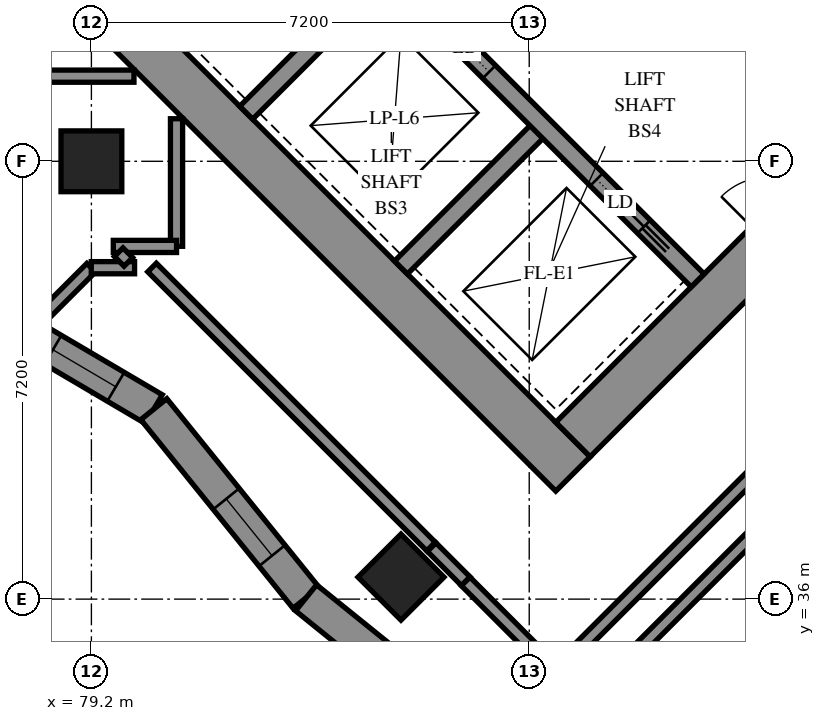
"""IFC4 building model, lengths in metres.
Left out: names, types, materials, properties, quantities, classifications, styles, units other than length and angle.
Written with IfcOpenShell. Run it as: python <this file> out.ifc"""

import sys

from ifc_helpers import new_model, si_unit, direction, frame, frame_2d, origin, origin_2d, place, context, subcontext, project, spatial, polyline, rectangle, outline, extrude, element, fill, save


model = new_model("IFC4")
c1 = context("Model", 3, precision=1e-05, world=origin(), true_north=direction((0.0, 1.0)))
c2 = subcontext(c1, "Body", "Model", "MODEL_VIEW")
j1 = project(units=[si_unit("LENGTHUNIT", "METRE"), si_unit("PLANEANGLEUNIT", "RADIAN")], contexts=[c1])
p1 = place(None, origin())
s1 = spatial("IfcSite", under=j1, at=p1, CompositionType="ELEMENT")
p2 = place(p1, origin())
s2 = spatial("IfcBuilding", under=s1, at=p2, CompositionType="ELEMENT")
p3 = place(p2, frame((0.0, 0.0, 94.8)))
s3 = spatial("IfcBuildingStorey", under=s2, at=p3, CompositionType="ELEMENT", Elevation=94.8)
for number, where, z_axis, x_axis in (
    (1, (79.2, 43.2, 0.0), (0.0, 0.0, 1.0), (1.0, 0.0, 0.0)),
    (2, (84.291, 36.362, 0.0), (0.0, 0.0, 1.0), (0.707, -0.707, 0.0)),
):
    element("IfcColumn", number, at=place(p3, frame(where, z_axis=z_axis, x_axis=x_axis)), inside=s3, PredefinedType="COLUMN", context=c2, shape_type="SweptSolid", body=[
        extrude(rectangle(XDim=1.0, YDim=1.0, at=origin_2d()), origin(), (0.0, 0.0, 1.0), 3.1),
    ])
p4 = place(p3, frame((75.806, 49.373, -0.3), z_axis=(0.0, 0.0, 1.0), x_axis=(0.7071067812, -0.7071067812, 0.0)))
e3 = element("IfcWall", 3, at=p4, inside=s3, PredefinedType="SHEAR", context=c2, shape_type="SweptSolid", body=[
    extrude(rectangle(XDim=16.0, YDim=0.8, at=frame_2d((8.0, 0.0))), origin(), (0.0, 0.0, 1.0), 2.7),
])
p5 = place(p3, frame((87.12, 38.625, -0.3), z_axis=(0.0, 0.0, 1.0), x_axis=(0.7071067812, 0.7071067812, 0.0)))
e4 = element("IfcWall", 4, at=p5, inside=s3, PredefinedType="SHEAR", context=c2, shape_type="SweptSolid", body=[
    extrude(rectangle(XDim=14.4, YDim=0.8, at=frame_2d((7.2, 0.0))), origin(), (0.0, 0.0, 1.0), 2.7),
])
p6 = place(p5, frame((4.55, 0.0, 0.3)))
e5 = element("IfcOpeningElement", 5, at=p6, cuts=e4, PredefinedType="OPENING", context=c2, shape_type="SweptSolid", body=[
    extrude(rectangle(XDim=1.1, YDim=2.1, at=frame_2d((0.55, 1.05))), frame((0.0, 0.41, 0.0), z_axis=(0.0, -1.0, 0.0), x_axis=(1.0, 0.0, 0.0)), (0.0, 0.0, 1.0), 0.82),
])
p7 = place(p5, frame((11.35, 0.0, 0.3)))
e6 = element("IfcOpeningElement", 6, at=p7, cuts=e4, PredefinedType="OPENING", context=c2, shape_type="SweptSolid", body=[
    extrude(rectangle(XDim=1.1, YDim=2.1, at=frame_2d((0.55, 1.05))), frame((0.0, 0.41, 0.0), z_axis=(0.0, -1.0, 0.0), x_axis=(1.0, 0.0, 0.0)), (0.0, 0.0, 1.0), 0.82),
])
for number, where, z_axis, x_axis in (
    (7, (81.746, 43.999, 0.0), (0.0, 0.0, 1.0), (0.707, 0.707, 0.0)),
    (8, (84.291, 41.453, 0.0), (0.0, 0.0, 1.0), (0.707, 0.707, 0.0)),
):
    element("IfcWall", number, at=place(p3, frame(where, z_axis=z_axis, x_axis=x_axis)), inside=s3, PredefinedType="SOLIDWALL", context=c2, shape_type="SweptSolid", body=[
        extrude(rectangle(XDim=3.3, YDim=0.3, at=frame_2d((1.65, 0.0))), origin(), (0.0, 0.0, 1.0), 3.1),
    ])
p8 = place(p3, frame((78.988, 51.423, 0.0), z_axis=(0.0, 0.0, 1.0), x_axis=(0.7071067812, -0.7071067812, 0.0)))
e9 = element("IfcWall", 9, at=p8, inside=s3, PredefinedType="SOLIDWALL", context=c2, shape_type="SweptSolid", body=[
    extrude(rectangle(XDim=14.4, YDim=0.3, at=frame_2d((7.2, 0.0))), origin(), (0.0, 0.0, 1.0), 3.1),
])
p9 = place(p8, frame((1.25, 0.0, 0.0)))
e10 = element("IfcOpeningElement", 10, at=p9, cuts=e9, PredefinedType="OPENING", context=c2, shape_type="SweptSolid", body=[
    extrude(rectangle(XDim=1.1, YDim=2.1, at=frame_2d((0.55, 1.05))), frame((0.0, 0.16, 0.0), z_axis=(0.0, -1.0, 0.0), x_axis=(1.0, 0.0, 0.0)), (0.0, 0.0, 1.0), 0.32),
])
p10 = place(p8, frame((4.85, 0.0, 0.0)))
e11 = element("IfcOpeningElement", 11, at=p10, cuts=e9, PredefinedType="OPENING", context=c2, shape_type="SweptSolid", body=[
    extrude(rectangle(XDim=1.1, YDim=2.1, at=frame_2d((0.55, 1.05))), frame((0.0, 0.16, 0.0), z_axis=(0.0, -1.0, 0.0), x_axis=(1.0, 0.0, 0.0)), (0.0, 0.0, 1.0), 0.32),
])
p11 = place(p8, frame((8.45, 0.0, 0.0)))
e12 = element("IfcOpeningElement", 12, at=p11, cuts=e9, PredefinedType="OPENING", context=c2, shape_type="SweptSolid", body=[
    extrude(rectangle(XDim=1.1, YDim=2.1, at=frame_2d((0.55, 1.05))), frame((0.0, 0.16, 0.0), z_axis=(0.0, -1.0, 0.0), x_axis=(1.0, 0.0, 0.0)), (0.0, 0.0, 1.0), 0.32),
])
p12 = place(p8, frame((12.05, 0.0, 0.0)))
e13 = element("IfcOpeningElement", 13, at=p12, cuts=e9, PredefinedType="OPENING", context=c2, shape_type="SweptSolid", body=[
    extrude(rectangle(XDim=1.1, YDim=2.1, at=frame_2d((0.55, 1.05))), frame((0.0, 0.16, 0.0), z_axis=(0.0, -1.0, 0.0), x_axis=(1.0, 0.0, 0.0)), (0.0, 0.0, 1.0), 0.32),
])
p13 = place(p3, frame((81.534, 53.969, 0.0), z_axis=(0.0, 0.0, 1.0), x_axis=(0.707103309, -0.7071102534, 0.0)))
e14 = element("IfcWall", 14, at=p13, inside=s3, PredefinedType="SOLIDWALL", context=c2, shape_type="SweptSolid", body=[
    extrude(rectangle(XDim=14.4, YDim=0.3, at=frame_2d((7.2, 0.0))), origin(), (0.0, 0.0, 1.0), 3.1),
])
p14 = place(p13, frame((12.05, 0.0, 0.0)))
e15 = element("IfcOpeningElement", 15, at=p14, cuts=e14, PredefinedType="OPENING", context=c2, shape_type="SweptSolid", body=[
    extrude(rectangle(XDim=1.1, YDim=2.1, at=frame_2d((0.55, 1.05))), frame((0.0, 0.16, 0.0), z_axis=(0.0, -1.0, 0.0), x_axis=(1.0, 0.0, 0.0)), (0.0, 0.0, 1.0), 0.32),
])
p15 = place(p3, frame((76.644, 41.233, 0.0), z_axis=(0.0, 0.0, 1.0), x_axis=(0.861767211, -0.5073039267, 0.0)))
e16 = element("IfcWall", 16, at=p15, inside=s3, PredefinedType="SOLIDWALL", context=c2, shape_type="SweptSolid", body=[
    extrude(outline(polyline([(0.033, -0.275), (4.107, -0.275), (4.207, 0.275), (-0.033, 0.275), (0.033, -0.275)])), origin(), (0.0, 0.0, 1.0), 3.1),
])
p16 = place(p15, frame((0.353, 0.0, 0.5)))
e17 = element("IfcOpeningElement", 17, at=p16, cuts=e16, PredefinedType="OPENING", context=c2, shape_type="SweptSolid", body=[
    extrude(rectangle(XDim=1.2, YDim=2.45, at=frame_2d((0.6, 1.225))), frame((0.0, 0.285, 0.0), z_axis=(0.0, -1.0, 0.0), x_axis=(1.0, 0.0, 0.0)), (0.0, 0.0, 1.0), 0.57),
])
p17 = place(p15, frame((2.232, 0.0, 0.5)))
e18 = element("IfcOpeningElement", 18, at=p17, cuts=e16, PredefinedType="OPENING", context=c2, shape_type="SweptSolid", body=[
    extrude(rectangle(XDim=1.2, YDim=2.45, at=frame_2d((0.6, 1.225))), frame((0.0, 0.285, 0.0), z_axis=(0.0, -1.0, 0.0), x_axis=(1.0, 0.0, 0.0)), (0.0, 0.0, 1.0), 0.57),
])
p18 = place(p3, frame((80.226, 39.124, 0.0), z_axis=(0.0, 0.0, 1.0), x_axis=(0.6280387215, -0.7781820894, 0.0)))
e19 = element("IfcWall", 19, at=p18, inside=s3, PredefinedType="SOLIDWALL", context=c2, shape_type="SweptSolid", body=[
    extrude(outline(polyline([(0.05, -0.275), (4.016, -0.275), (3.958, 0.275), (-0.05, 0.275), (0.05, -0.275)])), origin(), (0.0, 0.0, 1.0), 3.1),
])
p19 = place(p18, frame((1.896, 0.0, 0.5)))
e20 = element("IfcOpeningElement", 20, at=p19, cuts=e19, PredefinedType="OPENING", context=c2, shape_type="SweptSolid", body=[
    extrude(rectangle(XDim=1.2, YDim=2.45, at=frame_2d((0.6, 1.225))), frame((0.0, 0.285, 0.0), z_axis=(0.0, -1.0, 0.0), x_axis=(1.0, 0.0, 0.0)), (0.0, 0.0, 1.0), 0.57),
])
p20 = place(p3, frame((82.73, 36.021, 0.0), z_axis=(0.0, 0.0, 1.0), x_axis=(0.7781804948, -0.6280406974, 0.0)))
e21 = element("IfcWall", 21, at=p20, inside=s3, PredefinedType="SOLIDWALL", context=c2, shape_type="SweptSolid", body=[
    extrude(outline(polyline([(-0.029, -0.275), (3.937, -0.275), (3.996, 0.275), (0.029, 0.275), (-0.029, -0.275)])), origin(), (0.0, 0.0, 1.0), 3.1),
])
p21 = place(p20, frame((1.717, 0.0, 0.5)))
e22 = element("IfcOpeningElement", 22, at=p21, cuts=e21, PredefinedType="OPENING", context=c2, shape_type="SweptSolid", body=[
    extrude(rectangle(XDim=1.2, YDim=2.45, at=frame_2d((0.6, 1.225))), frame((0.0, 0.285, 0.0), z_axis=(0.0, -1.0, 0.0), x_axis=(1.0, 0.0, 0.0)), (0.0, 0.0, 1.0), 0.57),
])
p22 = place(p3, frame((86.835, 34.806, 0.0), z_axis=(0.0, 0.0, 1.0), x_axis=(0.7071067812, 0.7071067812, 0.0)))
e23 = element("IfcWall", 23, at=p22, inside=s3, PredefinedType="PARTITIONING", context=c2, shape_type="SweptSolid", body=[
    extrude(rectangle(XDim=9.201, YDim=0.2, at=frame_2d((4.601, 0.0))), origin(), (0.0, 0.0, 1.0), 3.1),
])
p23 = place(p3, frame((86.343, 33.316, 0.0), z_axis=(0.0, 0.0, 1.0), x_axis=(0.7069848641, 0.7072286772, 0.0)))
e24 = element("IfcWall", 24, at=p23, inside=s3, PredefinedType="PARTITIONING", context=c2, shape_type="SweptSolid", body=[
    extrude(rectangle(XDim=8.203, YDim=0.2, at=frame_2d((4.101, 0.0))), origin(), (0.0, 0.0, 1.0), 3.1),
])
p24 = place(p3, frame((80.197, 41.453, 0.0), z_axis=(0.0, 0.0, 1.0), x_axis=(0.7071067812, -0.7071067812, 0.0)))
e25 = element("IfcWall", 25, at=p24, inside=s3, PredefinedType="PARTITIONING", context=c2, shape_type="SweptSolid", body=[
    extrude(rectangle(XDim=6.488, YDim=0.2, at=frame_2d((3.244, 0.0))), origin(), (0.0, 0.0, 1.0), 3.1),
])
p25 = place(p3, frame((89.881, 31.771, 0.0), z_axis=(0.0, 0.0, 1.0), x_axis=(0.7071067812, 0.7071067812, 0.0)))
e26 = element("IfcWall", 26, at=p25, inside=s3, PredefinedType="PARTITIONING", context=c2, shape_type="SweptSolid", body=[
    extrude(rectangle(XDim=5.787, YDim=0.2, at=frame_2d((2.893, 0.0))), origin(), (0.0, 0.0, 1.0), 3.1),
])
p26 = place(p3, frame((85.353, 36.293, 0.0), z_axis=(0.0, 0.0, 1.0), x_axis=(0.7066304548, -0.7075827869, 0.0)))
e27 = element("IfcWall", 27, at=p26, inside=s3, PredefinedType="PARTITIONING", context=c2, shape_type="SweptSolid", body=[
    extrude(rectangle(XDim=2.1, YDim=0.2, at=frame_2d((1.05, 0.0))), origin(), (0.0, 0.0, 1.0), 3.1),
])
for number, where, z_axis, x_axis in (
    (28, (77.802, 44.6, 0.0), (0.0, 0.0, 1.0), (1.0, 0.0, 0.0)),
    (29, (80.6, 41.802, 0.0), (0.0, 0.0, 1.0), (0.0, 1.0, 0.0)),
):
    element("IfcWall", number, at=place(p3, frame(where, z_axis=z_axis, x_axis=x_axis)), inside=s3, PredefinedType="PARTITIONING", context=c2, shape_type="SweptSolid", body=[
        extrude(rectangle(XDim=2.098, YDim=0.2, at=frame_2d((1.049, 0.0))), origin(), (0.0, 0.0, 1.0), 3.1),
    ])
p27 = place(p3, frame((78.314, 40.569, 0.0), z_axis=(0.0, 0.0, 1.0), x_axis=(0.7071067812, 0.7071067812, 0.0)))
e30 = element("IfcWall", 30, at=p27, inside=s3, PredefinedType="PARTITIONING", context=c2, shape_type="SweptSolid", body=[
    extrude(rectangle(XDim=1.247, YDim=0.2, at=frame_2d((0.623, 0.0))), origin(), (0.0, 0.0, 1.0), 3.1),
])
p28 = place(p3, frame((79.56, 41.8, 0.0), z_axis=(0.0, 0.0, 1.0), x_axis=(1.0, 0.0, 0.0)))
e31 = element("IfcWall", 31, at=p28, inside=s3, PredefinedType="PARTITIONING", context=c2, shape_type="SweptSolid", body=[
    extrude(rectangle(XDim=1.04, YDim=0.2, at=frame_2d((0.52, 0.0))), origin(), (0.0, 0.0, 1.0), 3.1),
])
p29 = place(p3, frame((84.795, 36.855, 0.0), z_axis=(0.0, 0.0, 1.0), x_axis=(0.7071067812, -0.7071067812, 0.0)))
e32 = element("IfcWall", 32, at=p29, inside=s3, PredefinedType="PARTITIONING", context=c2, shape_type="SweptSolid", body=[
    extrude(rectangle(XDim=0.792, YDim=0.2, at=frame_2d((0.396, 0.0))), origin(), (0.0, 0.0, 1.0), 3.1),
])
p30 = place(p3, frame((79.198, 41.45, 0.0), z_axis=(0.0, 0.0, 1.0), x_axis=(1.0, 0.0, 0.0)))
e33 = element("IfcWall", 33, at=p30, inside=s3, PredefinedType="PARTITIONING", context=c2, shape_type="SweptSolid", body=[
    extrude(rectangle(XDim=0.712, YDim=0.2, at=frame_2d((0.356, 0.0))), origin(), (0.0, 0.0, 1.0), 3.1),
])
p31 = place(p3, frame((79.649, 41.705, 0.0), z_axis=(0.0, 0.0, 1.0), x_axis=(0.7068844555, -0.707329037, 0.0)))
e34 = element("IfcWall", 34, at=p31, inside=s3, PredefinedType="PARTITIONING", context=c2, shape_type="SweptSolid", body=[
    extrude(rectangle(XDim=0.225, YDim=0.2, at=frame_2d((0.112, 0.0))), origin(), (0.0, 0.0, 1.0), 3.1),
])
p32 = place(p17, origin())
e35 = element("IfcWindow", 35, at=p32, inside=s3, PartitioningType="SINGLE_PANEL", PredefinedType="WINDOW", context=c2, shape_type="SweptSolid", body=[
    extrude(rectangle(XDim=1.2, YDim=2.45, at=frame_2d((0.6, 1.225))), frame((0.0, 0.155, 0.0), z_axis=(0.0, -1.0, 0.0), x_axis=(1.0, 0.0, 0.0)), (0.0, 0.0, 1.0), 0.06),
])
fill(e18, e35)
p33 = place(p19, origin())
e36 = element("IfcWindow", 36, at=p33, inside=s3, PartitioningType="SINGLE_PANEL", PredefinedType="WINDOW", context=c2, shape_type="SweptSolid", body=[
    extrude(rectangle(XDim=1.2, YDim=2.45, at=frame_2d((0.6, 1.225))), frame((0.0, 0.155, 0.0), z_axis=(0.0, -1.0, 0.0), x_axis=(1.0, 0.0, 0.0)), (0.0, 0.0, 1.0), 0.06),
])
fill(e20, e36)
p34 = place(p11, origin())
e37 = element("IfcDoor", 37, at=p34, inside=s3, OperationType="SLIDING_TO_LEFT", PredefinedType="DOOR", context=c2, shape_type="SweptSolid", body=[
    extrude(rectangle(XDim=1.1, YDim=2.1, at=frame_2d((0.55, 1.05))), frame((0.0, 0.025, 0.0), z_axis=(0.0, -1.0, 0.0), x_axis=(1.0, 0.0, 0.0)), (0.0, 0.0, 1.0), 0.05),
])
fill(e12, e37)
p35 = place(p12, origin())
e38 = element("IfcDoor", 38, at=p35, inside=s3, OperationType="SLIDING_TO_RIGHT", PredefinedType="DOOR", context=c2, shape_type="SweptSolid", body=[
    extrude(rectangle(XDim=1.1, YDim=2.1, at=frame_2d((0.55, 1.05))), frame((0.0, 0.025, 0.0), z_axis=(0.0, -1.0, 0.0), x_axis=(1.0, 0.0, 0.0)), (0.0, 0.0, 1.0), 0.05),
])
fill(e13, e38)
save(model, sys.argv[1])
